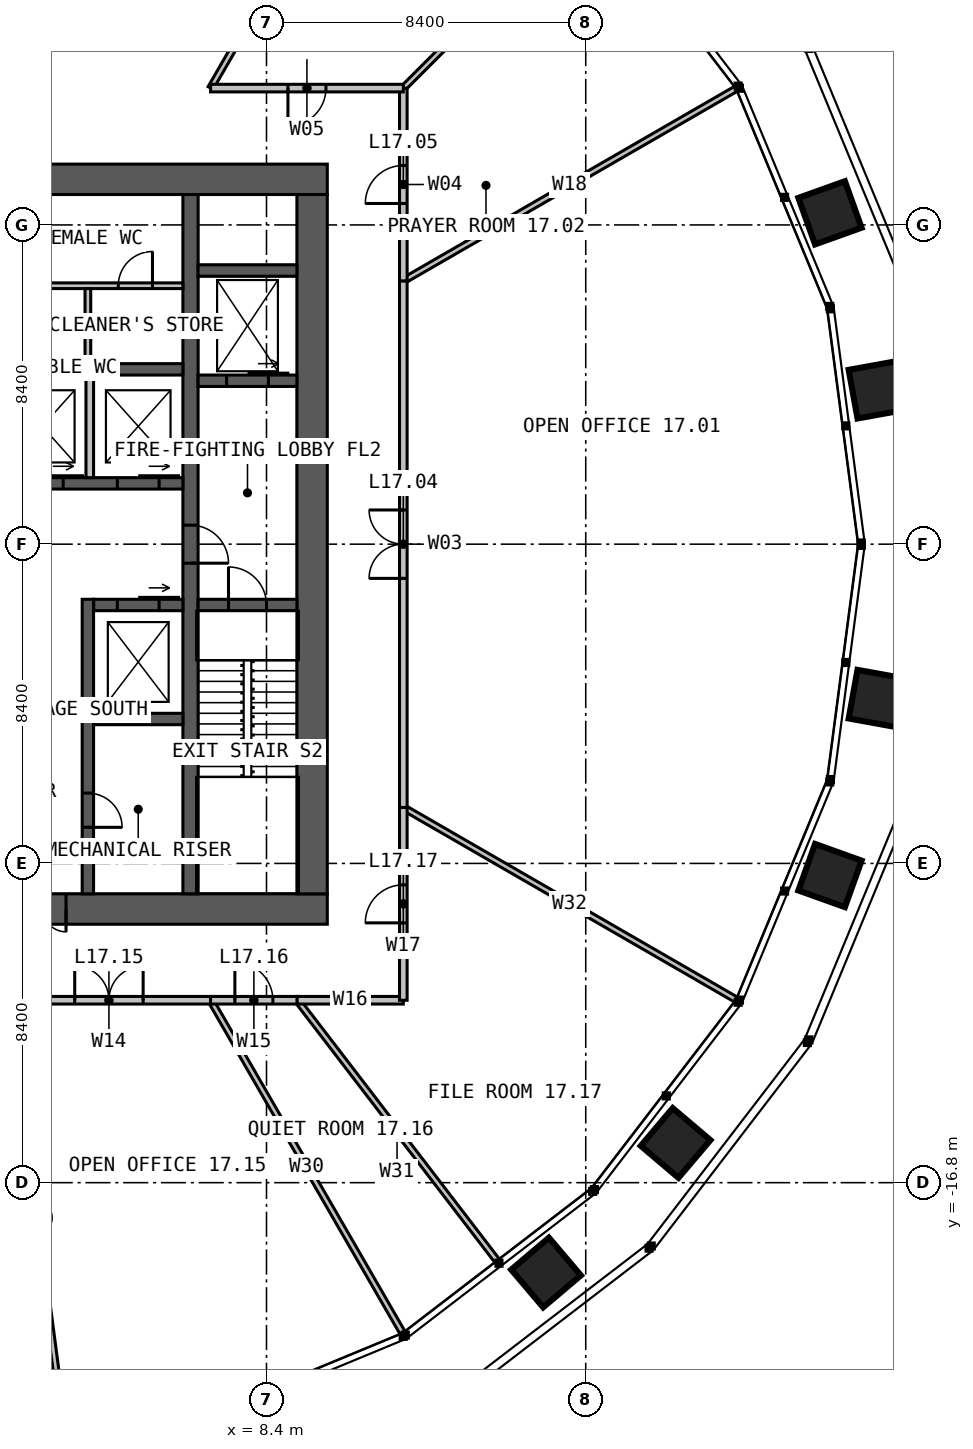
"""IFC4 building model, lengths in metres.
Left out: names, types, materials, properties, quantities, classifications, styles, units other than length and angle.
Written with IfcOpenShell. Run it as: python <this file> out.ifc"""

import sys

from ifc_helpers import new_model, si_unit, direction, frame, frame_2d, origin, place, context, subcontext, project, spatial, rectangle, extrude, element, fill, save


model = new_model("IFC4")
c1 = context("Model", 3, precision=1e-05, world=origin(), true_north=direction((0.0, 1.0)))
c2 = subcontext(c1, "Body", "Model", "MODEL_VIEW")
j1 = project(units=[si_unit("LENGTHUNIT", "METRE"), si_unit("PLANEANGLEUNIT", "RADIAN")], contexts=[c1])
p1 = place(None, origin())
s1 = spatial("IfcSite", under=j1, at=p1, CompositionType="ELEMENT")
p2 = place(p1, origin())
s2 = spatial("IfcBuilding", under=s1, at=p2, CompositionType="ELEMENT")
p3 = place(p2, frame((0.0, 0.0, 73.0)))
s3 = spatial("IfcBuildingStorey", under=s2, at=p3, CompositionType="ELEMENT", Elevation=73.0)
p4 = place(p3, frame((-10.0, 9.6, 0.0), z_axis=(0.0, 0.0, 1.0), x_axis=(1.0, 0.0, 0.0)))
e1 = element("IfcWall", 1, at=p4, inside=s3, PredefinedType="SOLIDWALL", context=c2, shape_type="SweptSolid", body=[
    extrude(rectangle(XDim=20.0, YDim=0.8, at=frame_2d((10.0, 0.0))), origin(), (0.0, 0.0, 1.0), 4.0),
])
p5 = place(p4, frame((9.4, 0.0, 0.0)))
e2 = element("IfcOpeningElement", 2, at=p5, cuts=e1, PredefinedType="OPENING", context=c2, shape_type="SweptSolid", body=[
    extrude(rectangle(XDim=1.2, YDim=2.2, at=frame_2d((0.6, 1.1))), frame((0.0, 0.41, 0.0), z_axis=(0.0, -1.0, 0.0), x_axis=(1.0, 0.0, 0.0)), (0.0, 0.0, 1.0), 0.82),
])
p6 = place(p3, frame((10.0, -9.6, 0.0), z_axis=(0.0, 0.0, 1.0), x_axis=(-1.0, 0.0, 0.0)))
e3 = element("IfcWall", 3, at=p6, inside=s3, PredefinedType="SOLIDWALL", context=c2, shape_type="SweptSolid", body=[
    extrude(rectangle(XDim=20.0, YDim=0.8, at=frame_2d((10.0, 0.0))), origin(), (0.0, 0.0, 1.0), 4.0),
])
p7 = place(p6, frame((6.875, 0.0, 0.0)))
e4 = element("IfcOpeningElement", 4, at=p7, cuts=e3, PredefinedType="OPENING", context=c2, shape_type="SweptSolid", body=[
    extrude(rectangle(XDim=1.2, YDim=2.2, at=frame_2d((0.6, 1.1))), frame((0.0, 0.41, 0.0), z_axis=(0.0, -1.0, 0.0), x_axis=(1.0, 0.0, 0.0)), (0.0, 0.0, 1.0), 0.82),
])
p8 = place(p3, frame((9.6, -9.2, 0.0), z_axis=(0.0, 0.0, 1.0), x_axis=(0.0, 1.0, 0.0)))
e5 = element("IfcWall", 5, at=p8, inside=s3, PredefinedType="SOLIDWALL", context=c2, shape_type="SweptSolid", body=[
    extrude(rectangle(XDim=18.4, YDim=0.8, at=frame_2d((9.2, 0.0))), origin(), (0.0, 0.0, 1.0), 4.0),
])
p9 = place(p3, frame((6.4, 9.2, 0.0), z_axis=(0.0, 0.0, 1.0), x_axis=(0.0, -1.0, 0.0)))
e6 = element("IfcWall", 6, at=p9, inside=s3, PredefinedType="SOLIDWALL", context=c2, shape_type="SweptSolid", body=[
    extrude(rectangle(XDim=18.4, YDim=0.4, at=frame_2d((9.2, 0.0))), origin(), (0.0, 0.0, 1.0), 4.0),
])
p10 = place(p9, frame((8.7, 0.0, 0.0)))
e7 = element("IfcOpeningElement", 7, at=p10, cuts=e6, PredefinedType="OPENING", context=c2, shape_type="SweptSolid", body=[
    extrude(rectangle(XDim=1.0, YDim=2.2, at=frame_2d((0.5, 1.1))), frame((0.0, 0.21, 0.0), z_axis=(0.0, -1.0, 0.0), x_axis=(1.0, 0.0, 0.0)), (0.0, 0.0, 1.0), 0.42),
])
p11 = place(p3, frame((1.35, 1.6, 0.0), z_axis=(0.0, 0.0, 1.0), x_axis=(1.0, 0.0, 0.0)))
e8 = element("IfcWall", 8, at=p11, inside=s3, PredefinedType="SOLIDWALL", context=c2, shape_type="SweptSolid", body=[
    extrude(rectangle(XDim=4.85, YDim=0.3, at=frame_2d((2.425, 0.0))), origin(), (0.0, 0.0, 1.0), 4.0),
])
p12 = place(p11, frame((0.6, 0.0, 0.0)))
e9 = element("IfcOpeningElement", 9, at=p12, cuts=e8, PredefinedType="OPENING", context=c2, shape_type="SweptSolid", body=[
    extrude(rectangle(XDim=1.1, YDim=2.2, at=frame_2d((0.55, 1.1))), frame((0.0, 0.16, 0.0), z_axis=(0.0, -1.0, 0.0), x_axis=(1.0, 0.0, 0.0)), (0.0, 0.0, 1.0), 0.32),
])
p13 = place(p11, frame((3.125, 0.0, 0.0)))
e10 = element("IfcOpeningElement", 10, at=p13, cuts=e8, PredefinedType="OPENING", context=c2, shape_type="SweptSolid", body=[
    extrude(rectangle(XDim=1.1, YDim=2.2, at=frame_2d((0.55, 1.1))), frame((0.0, 0.16, 0.0), z_axis=(0.0, -1.0, 0.0), x_axis=(1.0, 0.0, 0.0)), (0.0, 0.0, 1.0), 0.32),
])
p14 = place(p3, frame((1.35, 4.6, 0.0), z_axis=(0.0, 0.0, 1.0), x_axis=(1.0, 0.0, 0.0)))
e11 = element("IfcWall", 11, at=p14, inside=s3, PredefinedType="SOLIDWALL", context=c2, shape_type="SweptSolid", body=[
    extrude(rectangle(XDim=4.85, YDim=0.3, at=frame_2d((2.425, 0.0))), origin(), (0.0, 0.0, 1.0), 4.0),
])
p15 = place(p3, frame((3.85, -1.6, 0.0), z_axis=(0.0, 0.0, 1.0), x_axis=(1.0, 0.0, 0.0)))
e12 = element("IfcWall", 12, at=p15, inside=s3, PredefinedType="SOLIDWALL", context=c2, shape_type="SweptSolid", body=[
    extrude(rectangle(XDim=2.35, YDim=0.3, at=frame_2d((1.175, 0.0))), origin(), (0.0, 0.0, 1.0), 4.0),
])
p16 = place(p15, frame((0.625, 0.0, 0.0)))
e13 = element("IfcOpeningElement", 13, at=p16, cuts=e12, PredefinedType="OPENING", context=c2, shape_type="SweptSolid", body=[
    extrude(rectangle(XDim=1.1, YDim=2.2, at=frame_2d((0.55, 1.1))), frame((0.0, 0.16, 0.0), z_axis=(0.0, -1.0, 0.0), x_axis=(1.0, 0.0, 0.0)), (0.0, 0.0, 1.0), 0.32),
])
p17 = place(p3, frame((3.85, -4.6, 0.0), z_axis=(0.0, 0.0, 1.0), x_axis=(1.0, 0.0, 0.0)))
e14 = element("IfcWall", 14, at=p17, inside=s3, PredefinedType="SOLIDWALL", context=c2, shape_type="SweptSolid", body=[
    extrude(rectangle(XDim=2.35, YDim=0.3, at=frame_2d((1.175, 0.0))), origin(), (0.0, 0.0, 1.0), 4.0),
])
p18 = place(p3, frame((3.7, -1.45, 0.0), z_axis=(0.0, 0.0, 1.0), x_axis=(0.0, -1.0, 0.0)))
e15 = element("IfcWall", 15, at=p18, inside=s3, PredefinedType="SOLIDWALL", context=c2, shape_type="SweptSolid", body=[
    extrude(rectangle(XDim=7.75, YDim=0.3, at=frame_2d((3.875, 0.0))), origin(), (0.0, 0.0, 1.0), 4.0),
])
p19 = place(p18, frame((5.1, 0.0, 0.0)))
e16 = element("IfcOpeningElement", 16, at=p19, cuts=e15, PredefinedType="OPENING", context=c2, shape_type="SweptSolid", body=[
    extrude(rectangle(XDim=0.9, YDim=2.2, at=frame_2d((0.45, 1.1))), frame((0.0, 0.16, 0.0), z_axis=(0.0, -1.0, 0.0), x_axis=(1.0, 0.0, 0.0)), (0.0, 0.0, 1.0), 0.32),
])
p20 = place(p3, frame((6.6, -1.6, 0.0), z_axis=(0.0, 0.0, 1.0), x_axis=(1.0, 0.0, 0.0)))
e17 = element("IfcWall", 17, at=p20, inside=s3, PredefinedType="SOLIDWALL", context=c2, shape_type="SweptSolid", body=[
    extrude(rectangle(XDim=2.6, YDim=0.3, at=frame_2d((1.3, 0.0))), origin(), (0.0, 0.0, 1.0), 4.0),
])
p21 = place(p20, frame((0.8, 0.0, 0.0)))
e18 = element("IfcOpeningElement", 18, at=p21, cuts=e17, PredefinedType="OPENING", context=c2, shape_type="SweptSolid", body=[
    extrude(rectangle(XDim=1.0, YDim=2.2, at=frame_2d((0.5, 1.1))), frame((0.0, 0.16, 0.0), z_axis=(0.0, -1.0, 0.0), x_axis=(1.0, 0.0, 0.0)), (0.0, 0.0, 1.0), 0.32),
])
p22 = place(p3, frame((6.6, 4.3, 0.0), z_axis=(0.0, 0.0, 1.0), x_axis=(1.0, 0.0, 0.0)))
e19 = element("IfcWall", 19, at=p22, inside=s3, PredefinedType="SOLIDWALL", context=c2, shape_type="SweptSolid", body=[
    extrude(rectangle(XDim=2.6, YDim=0.3, at=frame_2d((1.3, 0.0))), origin(), (0.0, 0.0, 1.0), 4.0),
])
p23 = place(p22, frame((0.75, 0.0, 0.0)))
e20 = element("IfcOpeningElement", 20, at=p23, cuts=e19, PredefinedType="OPENING", context=c2, shape_type="SweptSolid", body=[
    extrude(rectangle(XDim=1.1, YDim=2.2, at=frame_2d((0.55, 1.1))), frame((0.0, 0.16, 0.0), z_axis=(0.0, -1.0, 0.0), x_axis=(1.0, 0.0, 0.0)), (0.0, 0.0, 1.0), 0.32),
])
p24 = place(p3, frame((6.6, 7.2, 0.0), z_axis=(0.0, 0.0, 1.0), x_axis=(1.0, 0.0, 0.0)))
e21 = element("IfcWall", 21, at=p24, inside=s3, PredefinedType="SOLIDWALL", context=c2, shape_type="SweptSolid", body=[
    extrude(rectangle(XDim=2.6, YDim=0.3, at=frame_2d((1.3, 0.0))), origin(), (0.0, 0.0, 1.0), 4.0),
])
p25 = place(p3, frame((3.75, 1.75, 0.0), z_axis=(0.0, 0.0, 1.0), x_axis=(0.0, 1.0, 0.0)))
e22 = element("IfcWall", 22, at=p25, inside=s3, PredefinedType="SOLIDWALL", context=c2, shape_type="SweptSolid", body=[
    extrude(rectangle(XDim=2.7, YDim=0.2, at=frame_2d((1.35, 0.0))), origin(), (0.0, 0.0, 1.0), 3.75),
])
p26 = place(p3, frame((1.35, 6.8, 0.0), z_axis=(0.0, 0.0, 1.0), x_axis=(1.0, 0.0, 0.0)))
e23 = element("IfcWall", 23, at=p26, inside=s3, PredefinedType="PARTITIONING", context=c2, shape_type="SweptSolid", body=[
    extrude(rectangle(XDim=4.85, YDim=0.15, at=frame_2d((2.425, 0.0))), origin(), (0.0, 0.0, 1.0), 3.75),
])
p27 = place(p26, frame((3.15, 0.0, 0.0)))
e24 = element("IfcOpeningElement", 24, at=p27, cuts=e23, PredefinedType="OPENING", context=c2, shape_type="SweptSolid", body=[
    extrude(rectangle(XDim=0.9, YDim=2.2, at=frame_2d((0.45, 1.1))), frame((0.0, 0.085, 0.0), z_axis=(0.0, -1.0, 0.0), x_axis=(1.0, 0.0, 0.0)), (0.0, 0.0, 1.0), 0.17),
])
p28 = place(p3, frame((3.7, 4.75, 0.0), z_axis=(0.0, 0.0, 1.0), x_axis=(0.0, 1.0, 0.0)))
e25 = element("IfcWall", 25, at=p28, inside=s3, PredefinedType="PARTITIONING", context=c2, shape_type="SweptSolid", body=[
    extrude(rectangle(XDim=1.975, YDim=0.15, at=frame_2d((0.988, 0.0))), origin(), (0.0, 0.0, 1.0), 3.75),
])
for number, where, z_axis, x_axis in (
    (26, (12.0, -6.928, 0.0), (0.0, 0.0, 1.0), (0.866, -0.5, 0.0)),
    (27, (12.0, 6.928, 0.0), (0.0, 0.0, 1.0), (0.866, 0.5, 0.0)),
):
    element("IfcWall", number, at=place(p3, frame(where, z_axis=z_axis, x_axis=x_axis)), inside=s3, PredefinedType="PARTITIONING", context=c2, shape_type="SweptSolid", body=[
        extrude(rectangle(XDim=10.106, YDim=0.15, at=frame_2d((5.053, 0.0))), origin(), (0.0, 0.0, 1.0), 2.79),
    ])
p29 = place(p3, frame((12.0, 12.0, 0.0), z_axis=(0.0, 0.0, 1.0), x_axis=(0.707106781187, 0.707106781187, 0.0)))
e28 = element("IfcWall", 28, at=p29, inside=s3, PredefinedType="PARTITIONING", context=c2, shape_type="SweptSolid", body=[
    extrude(rectangle(XDim=6.992, YDim=0.15, at=frame_2d((3.496, 0.0))), origin(), (0.0, 0.0, 1.0), 2.79),
])
p30 = place(p3, frame((6.928, 12.0, 0.0), z_axis=(0.0, 0.0, 1.0), x_axis=(0.500002673408, 0.866023860286, 0.0)))
e29 = element("IfcWall", 29, at=p30, inside=s3, PredefinedType="PARTITIONING", context=c2, shape_type="SweptSolid", body=[
    extrude(rectangle(XDim=10.106, YDim=0.15, at=frame_2d((5.053, 0.0))), origin(), (0.0, 0.0, 1.0), 2.79),
])
p31 = place(p3, frame((1.58, -12.0, 0.0), z_axis=(0.0, 0.0, 1.0), x_axis=(0.130516833846, -0.991446093382, 0.0)))
e30 = element("IfcWall", 30, at=p31, inside=s3, PredefinedType="PARTITIONING", context=c2, shape_type="SweptSolid", body=[
    extrude(rectangle(XDim=11.654, YDim=0.15, at=frame_2d((5.827, 0.0))), origin(), (0.0, 0.0, 1.0), 2.79),
])
p32 = place(p3, frame((6.928, -12.0, 0.0), z_axis=(0.0, 0.0, 1.0), x_axis=(0.500002673408, -0.866023860286, 0.0)))
e31 = element("IfcWall", 31, at=p32, inside=s3, PredefinedType="PARTITIONING", context=c2, shape_type="SweptSolid", body=[
    extrude(rectangle(XDim=10.106, YDim=0.15, at=frame_2d((5.053, 0.0))), origin(), (0.0, 0.0, 1.0), 2.79),
])
p33 = place(p3, frame((9.208, -12.0, 0.0), z_axis=(0.0, 0.0, 1.0), x_axis=(0.608747993403, -0.793363649613, 0.0)))
e32 = element("IfcWall", 32, at=p33, inside=s3, PredefinedType="PARTITIONING", context=c2, shape_type="SweptSolid", body=[
    extrude(rectangle(XDim=8.632, YDim=0.15, at=frame_2d((4.316, 0.0))), origin(), (0.0, 0.0, 1.0), 2.79),
])
p34 = place(p3, frame((12.0, -6.928, 0.0), z_axis=(0.0, 0.0, 1.0), x_axis=(0.0, 1.0, 0.0)))
e33 = element("IfcWall", 33, at=p34, inside=s3, PredefinedType="PARTITIONING", context=c2, shape_type="SweptSolid", body=[
    extrude(rectangle(XDim=13.856, YDim=0.2, at=frame_2d((6.928, 0.0))), origin(), (0.0, 0.0, 1.0), 3.8),
])
p35 = place(p34, frame((6.028, 0.0, 0.0)))
e34 = element("IfcOpeningElement", 34, at=p35, cuts=e33, PredefinedType="OPENING", context=c2, shape_type="SweptSolid", body=[
    extrude(rectangle(XDim=1.8, YDim=2.2, at=frame_2d((0.9, 1.1))), frame((0.0, 0.11, 0.0), z_axis=(0.0, -1.0, 0.0), x_axis=(1.0, 0.0, 0.0)), (0.0, 0.0, 1.0), 0.22),
])
p36 = place(p3, frame((12.0, 6.928, 0.0), z_axis=(0.0, 0.0, 1.0), x_axis=(0.0, 1.0, 0.0)))
e35 = element("IfcWall", 35, at=p36, inside=s3, PredefinedType="PARTITIONING", context=c2, shape_type="SweptSolid", body=[
    extrude(rectangle(XDim=5.072, YDim=0.2, at=frame_2d((2.536, 0.0))), origin(), (0.0, 0.0, 1.0), 3.8),
])
p37 = place(p36, frame((2.036, 0.0, 0.0)))
e36 = element("IfcOpeningElement", 36, at=p37, cuts=e35, PredefinedType="OPENING", context=c2, shape_type="SweptSolid", body=[
    extrude(rectangle(XDim=1.0, YDim=2.2, at=frame_2d((0.5, 1.1))), frame((0.0, 0.11, 0.0), z_axis=(0.0, -1.0, 0.0), x_axis=(1.0, 0.0, 0.0)), (0.0, 0.0, 1.0), 0.22),
])
p38 = place(p3, frame((12.0, 12.0, 0.0), z_axis=(0.0, 0.0, 1.0), x_axis=(-1.0, 0.0, 0.0)))
e37 = element("IfcWall", 37, at=p38, inside=s3, PredefinedType="PARTITIONING", context=c2, shape_type="SweptSolid", body=[
    extrude(rectangle(XDim=5.072, YDim=0.2, at=frame_2d((2.536, 0.0))), origin(), (0.0, 0.0, 1.0), 3.8),
])
p39 = place(p38, frame((2.036, 0.0, 0.0)))
e38 = element("IfcOpeningElement", 38, at=p39, cuts=e37, PredefinedType="OPENING", context=c2, shape_type="SweptSolid", body=[
    extrude(rectangle(XDim=1.0, YDim=2.2, at=frame_2d((0.5, 1.1))), frame((0.0, 0.11, 0.0), z_axis=(0.0, -1.0, 0.0), x_axis=(1.0, 0.0, 0.0)), (0.0, 0.0, 1.0), 0.22),
])
p40 = place(p3, frame((1.58, -12.0, 0.0), z_axis=(0.0, 0.0, 1.0), x_axis=(1.0, 0.0, 0.0)))
e39 = element("IfcWall", 39, at=p40, inside=s3, PredefinedType="PARTITIONING", context=c2, shape_type="SweptSolid", body=[
    extrude(rectangle(XDim=5.348, YDim=0.2, at=frame_2d((2.674, 0.0))), origin(), (0.0, 0.0, 1.0), 3.8),
])
p41 = place(p40, frame((1.774, 0.0, 0.0)))
e40 = element("IfcOpeningElement", 40, at=p41, cuts=e39, PredefinedType="OPENING", context=c2, shape_type="SweptSolid", body=[
    extrude(rectangle(XDim=1.8, YDim=2.2, at=frame_2d((0.9, 1.1))), frame((0.0, 0.11, 0.0), z_axis=(0.0, -1.0, 0.0), x_axis=(1.0, 0.0, 0.0)), (0.0, 0.0, 1.0), 0.22),
])
p42 = place(p3, frame((6.928, -12.0, 0.0), z_axis=(0.0, 0.0, 1.0), x_axis=(1.0, 0.0, 0.0)))
e41 = element("IfcWall", 41, at=p42, inside=s3, PredefinedType="PARTITIONING", context=c2, shape_type="SweptSolid", body=[
    extrude(rectangle(XDim=2.28, YDim=0.2, at=frame_2d((1.14, 0.0))), origin(), (0.0, 0.0, 1.0), 3.8),
])
p43 = place(p42, frame((0.64, 0.0, 0.0)))
e42 = element("IfcOpeningElement", 42, at=p43, cuts=e41, PredefinedType="OPENING", context=c2, shape_type="SweptSolid", body=[
    extrude(rectangle(XDim=1.0, YDim=2.2, at=frame_2d((0.5, 1.1))), frame((0.0, 0.11, 0.0), z_axis=(0.0, -1.0, 0.0), x_axis=(1.0, 0.0, 0.0)), (0.0, 0.0, 1.0), 0.22),
])
p44 = place(p3, frame((9.208, -12.0, 0.0), z_axis=(0.0, 0.0, 1.0), x_axis=(1.0, 0.0, 0.0)))
e43 = element("IfcWall", 43, at=p44, inside=s3, PredefinedType="PARTITIONING", context=c2, shape_type="SweptSolid", body=[
    extrude(rectangle(XDim=2.792, YDim=0.2, at=frame_2d((1.396, 0.0))), origin(), (0.0, 0.0, 1.0), 3.8),
])
p45 = place(p3, frame((12.0, -12.0, 0.0), z_axis=(0.0, 0.0, 1.0), x_axis=(0.0, 1.0, 0.0)))
e44 = element("IfcWall", 44, at=p45, inside=s3, PredefinedType="PARTITIONING", context=c2, shape_type="SweptSolid", body=[
    extrude(rectangle(XDim=5.072, YDim=0.2, at=frame_2d((2.536, 0.0))), origin(), (0.0, 0.0, 1.0), 3.8),
])
p46 = place(p45, frame((2.036, 0.0, 0.0)))
e45 = element("IfcOpeningElement", 45, at=p46, cuts=e44, PredefinedType="OPENING", context=c2, shape_type="SweptSolid", body=[
    extrude(rectangle(XDim=1.0, YDim=2.2, at=frame_2d((0.5, 1.1))), frame((0.0, 0.11, 0.0), z_axis=(0.0, -1.0, 0.0), x_axis=(1.0, 0.0, 0.0)), (0.0, 0.0, 1.0), 0.22),
])
p47 = place(p7, origin())
e46 = element("IfcDoor", 46, at=p47, inside=s3, OperationType="DOUBLE_DOOR_SINGLE_SWING", PredefinedType="DOOR", context=c2, shape_type="SweptSolid", body=[
    extrude(rectangle(XDim=1.2, YDim=2.2, at=frame_2d((0.6, 1.1))), frame((0.0, 0.025, 0.0), z_axis=(0.0, -1.0, 0.0), x_axis=(1.0, 0.0, 0.0)), (0.0, 0.0, 1.0), 0.05),
])
fill(e4, e46)
p48 = place(p10, origin())
e47 = element("IfcDoor", 47, at=p48, inside=s3, OperationType="SINGLE_SWING_RIGHT", PredefinedType="DOOR", context=c2, shape_type="SweptSolid", body=[
    extrude(rectangle(XDim=1.0, YDim=2.2, at=frame_2d((0.5, 1.1))), frame((0.0, 0.025, 0.0), z_axis=(0.0, -1.0, 0.0), x_axis=(1.0, 0.0, 0.0)), (0.0, 0.0, 1.0), 0.05),
])
fill(e7, e47)
p49 = place(p21, origin())
e48 = element("IfcDoor", 48, at=p49, inside=s3, OperationType="SINGLE_SWING_LEFT", PredefinedType="DOOR", context=c2, shape_type="SweptSolid", body=[
    extrude(rectangle(XDim=1.0, YDim=2.2, at=frame_2d((0.5, 1.1))), frame((0.0, 0.025, 0.0), z_axis=(0.0, -1.0, 0.0), x_axis=(1.0, 0.0, 0.0)), (0.0, 0.0, 1.0), 0.05),
])
fill(e18, e48)
p50 = place(p19, origin())
e49 = element("IfcDoor", 49, at=p50, inside=s3, OperationType="SINGLE_SWING_RIGHT", PredefinedType="DOOR", context=c2, shape_type="SweptSolid", body=[
    extrude(rectangle(XDim=0.9, YDim=2.2, at=frame_2d((0.45, 1.1))), frame((0.0, 0.025, 0.0), z_axis=(0.0, -1.0, 0.0), x_axis=(1.0, 0.0, 0.0)), (0.0, 0.0, 1.0), 0.05),
])
fill(e16, e49)
p51 = place(p27, origin())
e50 = element("IfcDoor", 50, at=p51, inside=s3, OperationType="SINGLE_SWING_RIGHT", PredefinedType="DOOR", context=c2, shape_type="SweptSolid", body=[
    extrude(rectangle(XDim=0.9, YDim=2.2, at=frame_2d((0.45, 1.1))), frame((0.0, 0.025, 0.0), z_axis=(0.0, -1.0, 0.0), x_axis=(1.0, 0.0, 0.0)), (0.0, 0.0, 1.0), 0.05),
])
fill(e24, e50)
p52 = place(p12, origin())
e51 = element("IfcDoor", 51, at=p52, inside=s3, OperationType="SLIDING_TO_LEFT", PredefinedType="DOOR", context=c2, shape_type="SweptSolid", body=[
    extrude(rectangle(XDim=1.1, YDim=2.2, at=frame_2d((0.55, 1.1))), frame((0.0, 0.025, 0.0), z_axis=(0.0, -1.0, 0.0), x_axis=(1.0, 0.0, 0.0)), (0.0, 0.0, 1.0), 0.05),
])
fill(e9, e51)
p53 = place(p13, origin())
e52 = element("IfcDoor", 52, at=p53, inside=s3, OperationType="SLIDING_TO_LEFT", PredefinedType="DOOR", context=c2, shape_type="SweptSolid", body=[
    extrude(rectangle(XDim=1.1, YDim=2.2, at=frame_2d((0.55, 1.1))), frame((0.0, 0.025, 0.0), z_axis=(0.0, -1.0, 0.0), x_axis=(1.0, 0.0, 0.0)), (0.0, 0.0, 1.0), 0.05),
])
fill(e10, e52)
p54 = place(p16, origin())
e53 = element("IfcDoor", 53, at=p54, inside=s3, OperationType="SLIDING_TO_LEFT", PredefinedType="DOOR", context=c2, shape_type="SweptSolid", body=[
    extrude(rectangle(XDim=1.1, YDim=2.2, at=frame_2d((0.55, 1.1))), frame((0.0, 0.025, 0.0), z_axis=(0.0, -1.0, 0.0), x_axis=(1.0, 0.0, 0.0)), (0.0, 0.0, 1.0), 0.05),
])
fill(e13, e53)
p55 = place(p23, origin())
e54 = element("IfcDoor", 54, at=p55, inside=s3, OperationType="SLIDING_TO_LEFT", PredefinedType="DOOR", context=c2, shape_type="SweptSolid", body=[
    extrude(rectangle(XDim=1.1, YDim=2.2, at=frame_2d((0.55, 1.1))), frame((0.0, 0.025, 0.0), z_axis=(0.0, -1.0, 0.0), x_axis=(1.0, 0.0, 0.0)), (0.0, 0.0, 1.0), 0.05),
])
fill(e20, e54)
p56 = place(p35, origin())
e55 = element("IfcDoor", 55, at=p56, inside=s3, OperationType="DOUBLE_DOOR_SINGLE_SWING", PredefinedType="DOOR", context=c2, shape_type="SweptSolid", body=[
    extrude(rectangle(XDim=1.8, YDim=2.2, at=frame_2d((0.9, 1.1))), frame((0.0, 0.025, 0.0), z_axis=(0.0, -1.0, 0.0), x_axis=(1.0, 0.0, 0.0)), (0.0, 0.0, 1.0), 0.05),
])
fill(e34, e55)
p57 = place(p37, origin())
e56 = element("IfcDoor", 56, at=p57, inside=s3, OperationType="SINGLE_SWING_LEFT", PredefinedType="DOOR", context=c2, shape_type="SweptSolid", body=[
    extrude(rectangle(XDim=1.0, YDim=2.2, at=frame_2d((0.5, 1.1))), frame((0.0, 0.025, 0.0), z_axis=(0.0, -1.0, 0.0), x_axis=(1.0, 0.0, 0.0)), (0.0, 0.0, 1.0), 0.05),
])
fill(e36, e56)
p58 = place(p39, origin())
e57 = element("IfcDoor", 57, at=p58, inside=s3, OperationType="SINGLE_SWING_RIGHT", PredefinedType="DOOR", context=c2, shape_type="SweptSolid", body=[
    extrude(rectangle(XDim=1.0, YDim=2.2, at=frame_2d((0.5, 1.1))), frame((0.0, 0.025, 0.0), z_axis=(0.0, -1.0, 0.0), x_axis=(1.0, 0.0, 0.0)), (0.0, 0.0, 1.0), 0.05),
])
fill(e38, e57)
p59 = place(p41, origin())
e58 = element("IfcDoor", 58, at=p59, inside=s3, OperationType="DOUBLE_DOOR_SINGLE_SWING", PredefinedType="DOOR", context=c2, shape_type="SweptSolid", body=[
    extrude(rectangle(XDim=1.8, YDim=2.2, at=frame_2d((0.9, 1.1))), frame((0.0, 0.025, 0.0), z_axis=(0.0, -1.0, 0.0), x_axis=(1.0, 0.0, 0.0)), (0.0, 0.0, 1.0), 0.05),
])
fill(e40, e58)
p60 = place(p43, origin())
e59 = element("IfcDoor", 59, at=p60, inside=s3, OperationType="SINGLE_SWING_LEFT", PredefinedType="DOOR", context=c2, shape_type="SweptSolid", body=[
    extrude(rectangle(XDim=1.0, YDim=2.2, at=frame_2d((0.5, 1.1))), frame((0.0, 0.025, 0.0), z_axis=(0.0, -1.0, 0.0), x_axis=(1.0, 0.0, 0.0)), (0.0, 0.0, 1.0), 0.05),
])
fill(e42, e59)
p61 = place(p46, origin())
e60 = element("IfcDoor", 60, at=p61, inside=s3, OperationType="SINGLE_SWING_LEFT", PredefinedType="DOOR", context=c2, shape_type="SweptSolid", body=[
    extrude(rectangle(XDim=1.0, YDim=2.2, at=frame_2d((0.5, 1.1))), frame((0.0, 0.025, 0.0), z_axis=(0.0, -1.0, 0.0), x_axis=(1.0, 0.0, 0.0)), (0.0, 0.0, 1.0), 0.05),
])
fill(e45, e60)
save(model, sys.argv[1])
